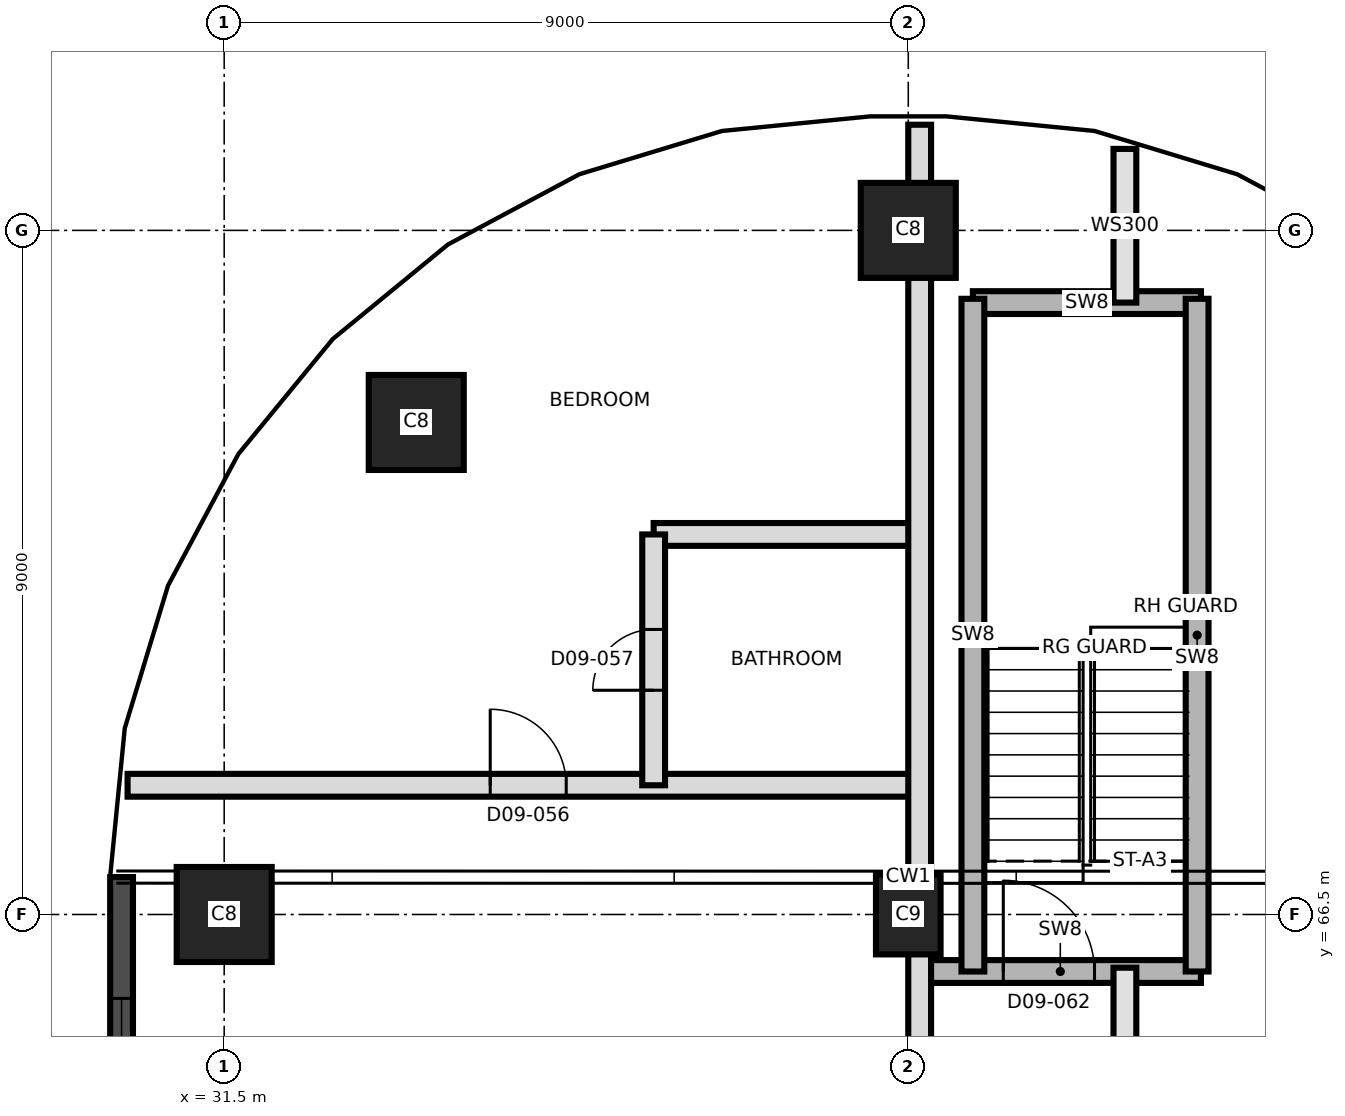
"""IFC4 building model, lengths in metres.
Left out: names, types, materials, properties, quantities, classifications, styles, units other than length and angle.
Written with IfcOpenShell. Run it as: python <this file> out.ifc"""

import sys

from ifc_helpers import new_model, si_unit, direction, frame, frame_2d, origin, origin_2d, place, context, subcontext, project, spatial, rectangle, extrude, element, fill, save


model = new_model("IFC4")
c1 = context("Model", 3, precision=1e-05, world=origin(), true_north=direction((0.0, 1.0)))
c2 = subcontext(c1, "Body", "Model", "MODEL_VIEW")
j1 = project(units=[si_unit("LENGTHUNIT", "METRE"), si_unit("PLANEANGLEUNIT", "RADIAN")], contexts=[c1])
p1 = place(None, origin())
s1 = spatial("IfcSite", under=j1, at=p1, CompositionType="ELEMENT")
p2 = place(p1, origin())
s2 = spatial("IfcBuilding", under=s1, at=p2, CompositionType="ELEMENT")
p3 = place(p2, frame((0.0, 0.0, 105.6)))
s3 = spatial("IfcBuildingStorey", under=s2, at=p3, CompositionType="ELEMENT", Elevation=105.6)
p4 = place(p3, frame((31.5, 66.5, 0.0), z_axis=(0.0, 0.0, 1.0), x_axis=(1.0, 0.0, 0.0)))
e1 = element("IfcColumn", 1, at=p4, inside=s3, PredefinedType="COLUMN", context=c2, shape_type="SweptSolid", body=[
    extrude(rectangle(XDim=1.25, YDim=1.25, at=origin_2d()), origin(), (0.0, 0.0, 1.0), 3.7),
])
p5 = place(p3, frame((40.5, 66.5, 0.0), z_axis=(0.0, 0.0, 1.0), x_axis=(0.0, 1.0, 0.0)))
e2 = element("IfcColumn", 2, at=p5, inside=s3, PredefinedType="COLUMN", context=c2, shape_type="SweptSolid", body=[
    extrude(rectangle(XDim=1.05, YDim=0.85, at=origin_2d()), origin(), (0.0, 0.0, 1.0), 3.7),
])
for number, where, z_axis, x_axis in (
    (3, (34.027, 72.973, 0.0), (0.0, 0.0, 1.0), (1.0, 0.0, 0.0)),
    (4, (40.5, 75.5, 0.0), (0.0, 0.0, 1.0), (1.0, 0.0, 0.0)),
):
    element("IfcColumn", number, at=place(p3, frame(where, z_axis=z_axis, x_axis=x_axis)), inside=s3, PredefinedType="COLUMN", context=c2, shape_type="SweptSolid", body=[
        extrude(rectangle(XDim=1.25, YDim=1.25, at=origin_2d()), origin(), (0.0, 0.0, 1.0), 3.7),
    ])
p6 = place(p3, frame((30.15, 66.992, 0.0), z_axis=(0.0, 0.0, 1.0), x_axis=(0.0, -1.0, 0.0)))
e5 = element("IfcWall", 5, at=p6, inside=s3, PredefinedType="SOLIDWALL", context=c2, shape_type="SweptSolid", body=[
    extrude(rectangle(XDim=32.968, YDim=0.3, at=frame_2d((16.484, 0.0))), origin(), (0.0, 0.0, 1.0), 3.4),
])
p7 = place(p6, frame((1.596, 0.0, 0.3)))
e6 = element("IfcOpeningElement", 6, at=p7, cuts=e5, PredefinedType="OPENING", context=c2, shape_type="SweptSolid", body=[
    extrude(rectangle(XDim=1.8, YDim=2.4, at=frame_2d((0.9, 1.2))), frame((0.0, 0.16, 0.0), z_axis=(0.0, -1.0, 0.0), x_axis=(1.0, 0.0, 0.0)), (0.0, 0.0, 1.0), 0.32),
])
p8 = place(p6, frame((5.142, 0.0, 0.9)))
e7 = element("IfcOpeningElement", 7, at=p8, cuts=e5, PredefinedType="OPENING", context=c2, shape_type="SweptSolid", body=[
    extrude(rectangle(XDim=4.2, YDim=1.7, at=frame_2d((2.1, 0.85))), frame((0.0, 0.16, 0.0), z_axis=(0.0, -1.0, 0.0), x_axis=(1.0, 0.0, 0.0)), (0.0, 0.0, 1.0), 0.32),
])
p9 = place(p6, frame((9.642, 0.0, 0.9)))
e8 = element("IfcOpeningElement", 8, at=p9, cuts=e5, PredefinedType="OPENING", context=c2, shape_type="SweptSolid", body=[
    extrude(rectangle(XDim=4.2, YDim=1.7, at=frame_2d((2.1, 0.85))), frame((0.0, 0.16, 0.0), z_axis=(0.0, -1.0, 0.0), x_axis=(1.0, 0.0, 0.0)), (0.0, 0.0, 1.0), 0.32),
])
p10 = place(p6, frame((14.142, 0.0, 0.9)))
e9 = element("IfcOpeningElement", 9, at=p10, cuts=e5, PredefinedType="OPENING", context=c2, shape_type="SweptSolid", body=[
    extrude(rectangle(XDim=4.2, YDim=1.7, at=frame_2d((2.1, 0.85))), frame((0.0, 0.16, 0.0), z_axis=(0.0, -1.0, 0.0), x_axis=(1.0, 0.0, 0.0)), (0.0, 0.0, 1.0), 0.32),
])
p11 = place(p6, frame((18.642, 0.0, 0.9)))
e10 = element("IfcOpeningElement", 10, at=p11, cuts=e5, PredefinedType="OPENING", context=c2, shape_type="SweptSolid", body=[
    extrude(rectangle(XDim=4.2, YDim=1.7, at=frame_2d((2.1, 0.85))), frame((0.0, 0.16, 0.0), z_axis=(0.0, -1.0, 0.0), x_axis=(1.0, 0.0, 0.0)), (0.0, 0.0, 1.0), 0.32),
])
p12 = place(p6, frame((23.142, 0.0, 0.9)))
e11 = element("IfcOpeningElement", 11, at=p12, cuts=e5, PredefinedType="OPENING", context=c2, shape_type="SweptSolid", body=[
    extrude(rectangle(XDim=4.2, YDim=1.7, at=frame_2d((2.1, 0.85))), frame((0.0, 0.16, 0.0), z_axis=(0.0, -1.0, 0.0), x_axis=(1.0, 0.0, 0.0)), (0.0, 0.0, 1.0), 0.32),
])
p13 = place(p6, frame((29.33, 0.0, 0.3)))
e12 = element("IfcOpeningElement", 12, at=p13, cuts=e5, PredefinedType="OPENING", context=c2, shape_type="SweptSolid", body=[
    extrude(rectangle(XDim=1.8, YDim=2.4, at=frame_2d((0.9, 1.2))), frame((0.0, 0.16, 0.0), z_axis=(0.0, -1.0, 0.0), x_axis=(1.0, 0.0, 0.0)), (0.0, 0.0, 1.0), 0.32),
])
p14 = place(p3, frame((40.65, 65.75, 0.0), z_axis=(0.0, 0.0, 1.0), x_axis=(1.0, 0.0, 0.0)))
e13 = element("IfcWall", 13, at=p14, inside=s3, PredefinedType="SHEAR", context=c2, shape_type="SweptSolid", body=[
    extrude(rectangle(XDim=3.7, YDim=0.3, at=frame_2d((1.85, 0.0))), origin(), (0.0, 0.0, 1.0), 3.4),
])
p15 = place(p14, frame((1.1, 0.0, 0.0)))
e14 = element("IfcOpeningElement", 14, at=p15, cuts=e13, PredefinedType="OPENING", context=c2, shape_type="SweptSolid", body=[
    extrude(rectangle(XDim=1.2, YDim=2.1, at=frame_2d((0.6, 1.05))), frame((0.0, 0.16, 0.0), z_axis=(0.0, -1.0, 0.0), x_axis=(1.0, 0.0, 0.0)), (0.0, 0.0, 1.0), 0.32),
])
p16 = place(p3, frame((30.229, 68.2, 0.0), z_axis=(0.0, 0.0, 1.0), x_axis=(1.0, 0.0, 0.0)))
e15 = element("IfcWall", 15, at=p16, inside=s3, PredefinedType="PARTITIONING", context=c2, shape_type="SweptSolid", body=[
    extrude(rectangle(XDim=10.421, YDim=0.3, at=frame_2d((5.21, 0.0))), origin(), (0.0, 0.0, 1.0), 3.4),
])
p17 = place(p16, frame((4.771, 0.0, 0.0)))
e16 = element("IfcOpeningElement", 16, at=p17, cuts=e15, PredefinedType="OPENING", context=c2, shape_type="SweptSolid", body=[
    extrude(rectangle(XDim=1.0, YDim=2.1, at=frame_2d((0.5, 1.05))), frame((0.0, 0.16, 0.0), z_axis=(0.0, -1.0, 0.0), x_axis=(1.0, 0.0, 0.0)), (0.0, 0.0, 1.0), 0.32),
])
p18 = place(p3, frame((37.15, 71.5, 0.0), z_axis=(0.0, 0.0, 1.0), x_axis=(1.0, 0.0, 0.0)))
e17 = element("IfcWall", 17, at=p18, inside=s3, PredefinedType="PARTITIONING", context=c2, shape_type="SweptSolid", body=[
    extrude(rectangle(XDim=3.5, YDim=0.3, at=frame_2d((1.75, 0.0))), origin(), (0.0, 0.0, 1.0), 3.4),
])
p19 = place(p3, frame((41.35, 74.55, 0.0), z_axis=(0.0, 0.0, 1.0), x_axis=(1.0, 0.0, 0.0)))
e18 = element("IfcWall", 18, at=p19, inside=s3, PredefinedType="SHEAR", context=c2, shape_type="SweptSolid", body=[
    extrude(rectangle(XDim=3.0, YDim=0.3, at=frame_2d((1.5, 0.0))), origin(), (0.0, 0.0, 1.0), 3.4),
])
p20 = place(p3, frame((37.15, 68.2, 0.0), z_axis=(0.0, 0.0, 1.0), x_axis=(0.0, 1.0, 0.0)))
e19 = element("IfcWall", 19, at=p20, inside=s3, PredefinedType="PARTITIONING", context=c2, shape_type="SweptSolid", body=[
    extrude(rectangle(XDim=3.3, YDim=0.3, at=frame_2d((1.65, 0.0))), origin(), (0.0, 0.0, 1.0), 3.4),
])
p21 = place(p20, frame((1.25, 0.0, 0.0)))
e20 = element("IfcOpeningElement", 20, at=p21, cuts=e19, PredefinedType="OPENING", context=c2, shape_type="SweptSolid", body=[
    extrude(rectangle(XDim=0.8, YDim=2.1, at=frame_2d((0.4, 1.05))), frame((0.0, 0.16, 0.0), z_axis=(0.0, -1.0, 0.0), x_axis=(1.0, 0.0, 0.0)), (0.0, 0.0, 1.0), 0.32),
])
p22 = place(p3, frame((40.65, 39.8, 0.0), z_axis=(0.0, 0.0, 1.0), x_axis=(0.0, 1.0, 0.0)))
e21 = element("IfcWall", 21, at=p22, inside=s3, PredefinedType="PARTITIONING", context=c2, shape_type="SweptSolid", body=[
    extrude(rectangle(XDim=37.09, YDim=0.3, at=frame_2d((18.545, 0.0))), origin(), (0.0, 0.0, 1.0), 3.4),
])
p23 = place(p22, frame((0.835, 0.0, 0.0)))
e22 = element("IfcOpeningElement", 22, at=p23, cuts=e21, PredefinedType="OPENING", context=c2, shape_type="SweptSolid", body=[
    extrude(rectangle(XDim=1.2, YDim=2.1, at=frame_2d((0.6, 1.05))), frame((0.0, 0.16, 0.0), z_axis=(0.0, -1.0, 0.0), x_axis=(1.0, 0.0, 0.0)), (0.0, 0.0, 1.0), 0.32),
])
p24 = place(p22, frame((4.085, 0.0, 0.0)))
e23 = element("IfcOpeningElement", 23, at=p24, cuts=e21, PredefinedType="OPENING", context=c2, shape_type="SweptSolid", body=[
    extrude(rectangle(XDim=1.0, YDim=2.1, at=frame_2d((0.5, 1.05))), frame((0.0, 0.16, 0.0), z_axis=(0.0, -1.0, 0.0), x_axis=(1.0, 0.0, 0.0)), (0.0, 0.0, 1.0), 0.32),
])
p25 = place(p22, frame((11.62, 0.0, 0.0)))
e24 = element("IfcOpeningElement", 24, at=p25, cuts=e21, PredefinedType="OPENING", context=c2, shape_type="SweptSolid", body=[
    extrude(rectangle(XDim=1.0, YDim=2.4, at=frame_2d((0.5, 1.2))), frame((0.0, 0.16, 0.0), z_axis=(0.0, -1.0, 0.0), x_axis=(1.0, 0.0, 0.0)), (0.0, 0.0, 1.0), 0.32),
])
p26 = place(p22, frame((13.27, 0.0, 0.0)))
e25 = element("IfcOpeningElement", 25, at=p26, cuts=e21, PredefinedType="OPENING", context=c2, shape_type="SweptSolid", body=[
    extrude(rectangle(XDim=1.0, YDim=2.4, at=frame_2d((0.5, 1.2))), frame((0.0, 0.16, 0.0), z_axis=(0.0, -1.0, 0.0), x_axis=(1.0, 0.0, 0.0)), (0.0, 0.0, 1.0), 0.32),
])
p27 = place(p22, frame((21.2, 0.0, 0.0)))
e26 = element("IfcOpeningElement", 26, at=p27, cuts=e21, PredefinedType="OPENING", context=c2, shape_type="SweptSolid", body=[
    extrude(rectangle(XDim=1.0, YDim=2.4, at=frame_2d((0.5, 1.2))), frame((0.0, 0.16, 0.0), z_axis=(0.0, -1.0, 0.0), x_axis=(1.0, 0.0, 0.0)), (0.0, 0.0, 1.0), 0.32),
])
p28 = place(p3, frame((41.35, 65.75, 0.0), z_axis=(0.0, 0.0, 1.0), x_axis=(0.0, 1.0, 0.0)))
e27 = element("IfcWall", 27, at=p28, inside=s3, PredefinedType="SHEAR", context=c2, shape_type="SweptSolid", body=[
    extrude(rectangle(XDim=8.85, YDim=0.3, at=frame_2d((4.425, 0.0))), origin(), (0.0, 0.0, 1.0), 3.4),
])
p29 = place(p3, frame((43.35, 39.8, 0.0), z_axis=(0.0, 0.0, 1.0), x_axis=(0.0, 1.0, 0.0)))
e28 = element("IfcWall", 28, at=p29, inside=s3, PredefinedType="SOLIDWALL", context=c2, shape_type="SweptSolid", body=[
    extrude(rectangle(XDim=26.0, YDim=0.3, at=frame_2d((13.0, 0.0))), origin(), (0.0, 0.0, 1.0), 3.4),
])
p30 = place(p29, frame((2.05, 0.0, 0.0)))
e29 = element("IfcOpeningElement", 29, at=p30, cuts=e28, PredefinedType="OPENING", context=c2, shape_type="SweptSolid", body=[
    extrude(rectangle(XDim=1.0, YDim=2.4, at=frame_2d((0.5, 1.2))), frame((0.0, 0.16, 0.0), z_axis=(0.0, -1.0, 0.0), x_axis=(1.0, 0.0, 0.0)), (0.0, 0.0, 1.0), 0.32),
])
p31 = place(p29, frame((14.35, 0.0, 0.0)))
e30 = element("IfcOpeningElement", 30, at=p31, cuts=e28, PredefinedType="OPENING", context=c2, shape_type="SweptSolid", body=[
    extrude(rectangle(XDim=1.0, YDim=2.4, at=frame_2d((0.5, 1.2))), frame((0.0, 0.16, 0.0), z_axis=(0.0, -1.0, 0.0), x_axis=(1.0, 0.0, 0.0)), (0.0, 0.0, 1.0), 0.32),
])
p32 = place(p29, frame((21.25, 0.0, 0.0)))
e31 = element("IfcOpeningElement", 31, at=p32, cuts=e28, PredefinedType="OPENING", context=c2, shape_type="SweptSolid", body=[
    extrude(rectangle(XDim=1.0, YDim=2.4, at=frame_2d((0.5, 1.2))), frame((0.0, 0.16, 0.0), z_axis=(0.0, -1.0, 0.0), x_axis=(1.0, 0.0, 0.0)), (0.0, 0.0, 1.0), 0.32),
])
p33 = place(p3, frame((43.35, 74.55, 0.0), z_axis=(0.0, 0.0, 1.0), x_axis=(0.0, 1.0, 0.0)))
e32 = element("IfcWall", 32, at=p33, inside=s3, PredefinedType="SOLIDWALL", context=c2, shape_type="SweptSolid", body=[
    extrude(rectangle(XDim=2.022, YDim=0.3, at=frame_2d((1.011, 0.0))), origin(), (0.0, 0.0, 1.0), 3.4),
])
p34 = place(p3, frame((44.3, 65.75, 0.0), z_axis=(0.0, 0.0, 1.0), x_axis=(0.0, 1.0, 0.0)))
e33 = element("IfcWall", 33, at=p34, inside=s3, PredefinedType="SHEAR", context=c2, shape_type="SweptSolid", body=[
    extrude(rectangle(XDim=8.85, YDim=0.3, at=frame_2d((4.425, 0.0))), origin(), (0.0, 0.0, 1.0), 3.4),
])
p35 = place(p7, origin())
e34 = element("IfcWindow", 34, at=p35, inside=s3, PartitioningType="SINGLE_PANEL", PredefinedType="WINDOW", context=c2, shape_type="SweptSolid", body=[
    extrude(rectangle(XDim=1.8, YDim=2.4, at=frame_2d((0.9, 1.2))), frame((0.0, 0.03, 0.0), z_axis=(0.0, -1.0, 0.0), x_axis=(1.0, 0.0, 0.0)), (0.0, 0.0, 1.0), 0.06),
])
fill(e6, e34)
p36 = place(p17, origin())
e35 = element("IfcDoor", 35, at=p36, inside=s3, OperationType="SINGLE_SWING_RIGHT", PredefinedType="DOOR", context=c2, shape_type="SweptSolid", body=[
    extrude(rectangle(XDim=1.0, YDim=2.1, at=frame_2d((0.5, 1.05))), frame((0.0, 0.025, 0.0), z_axis=(0.0, -1.0, 0.0), x_axis=(1.0, 0.0, 0.0)), (0.0, 0.0, 1.0), 0.05),
])
fill(e16, e35)
p37 = place(p21, origin())
e36 = element("IfcDoor", 36, at=p37, inside=s3, OperationType="SINGLE_SWING_LEFT", PredefinedType="DOOR", context=c2, shape_type="SweptSolid", body=[
    extrude(rectangle(XDim=0.8, YDim=2.1, at=frame_2d((0.4, 1.05))), frame((0.0, 0.025, 0.0), z_axis=(0.0, -1.0, 0.0), x_axis=(1.0, 0.0, 0.0)), (0.0, 0.0, 1.0), 0.05),
])
fill(e20, e36)
p38 = place(p15, origin())
e37 = element("IfcDoor", 37, at=p38, inside=s3, OperationType="SINGLE_SWING_RIGHT", PredefinedType="DOOR", context=c2, shape_type="SweptSolid", body=[
    extrude(rectangle(XDim=1.2, YDim=2.1, at=frame_2d((0.6, 1.05))), frame((0.0, 0.025, 0.0), z_axis=(0.0, -1.0, 0.0), x_axis=(1.0, 0.0, 0.0)), (0.0, 0.0, 1.0), 0.05),
])
fill(e14, e37)
save(model, sys.argv[1])
